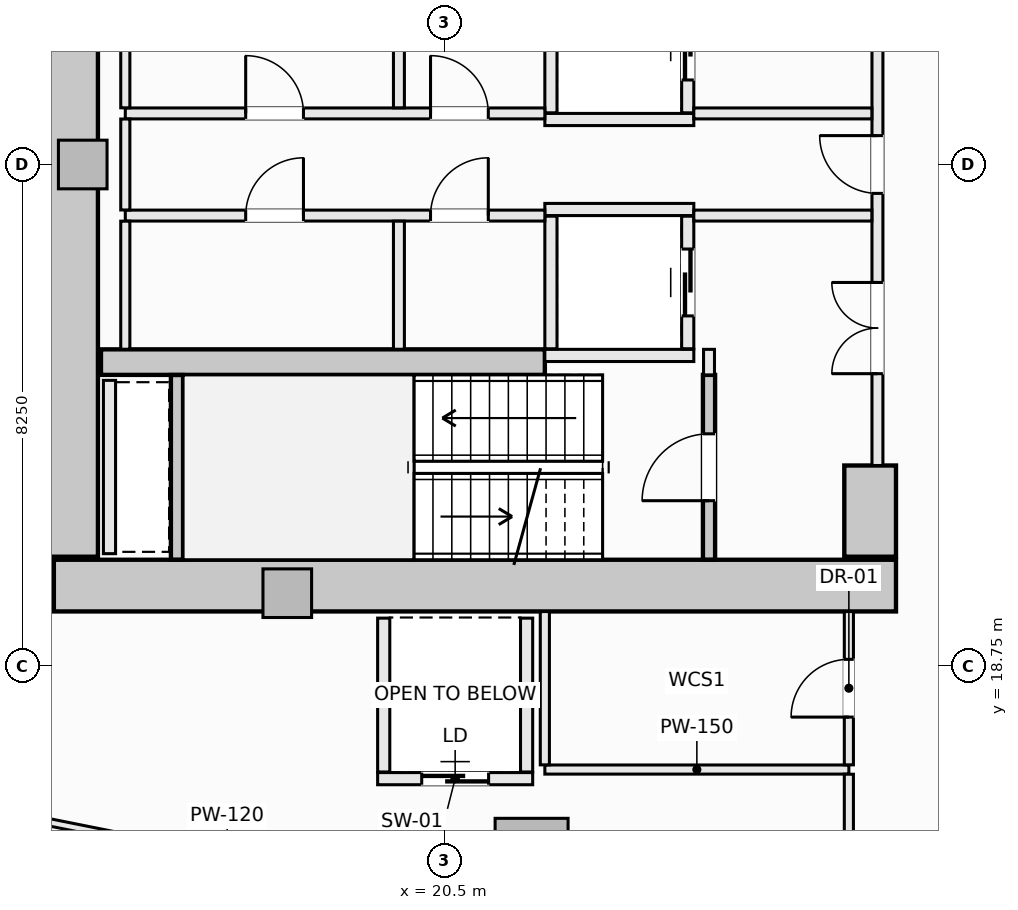
"""IFC4 building model, lengths in metres.
Left out: names, types, materials, properties, quantities, classifications, styles, units other than length and angle.
Written with IfcOpenShell. Run it as: python <this file> out.ifc"""

import sys

from ifc_helpers import new_model, si_unit, direction, frame, frame_2d, origin, origin_2d, place, context, subcontext, project, spatial, rectangle, extrude, element, fill, save


model = new_model("IFC4")
c1 = context("Model", 3, precision=1e-05, world=origin(), true_north=direction((0.0, 1.0)))
c2 = subcontext(c1, "Body", "Model", "MODEL_VIEW")
j1 = project(units=[si_unit("LENGTHUNIT", "METRE"), si_unit("PLANEANGLEUNIT", "RADIAN")], contexts=[c1])
p1 = place(None, origin())
s1 = spatial("IfcSite", under=j1, at=p1, CompositionType="ELEMENT")
p2 = place(p1, origin())
s2 = spatial("IfcBuilding", under=s1, at=p2, CompositionType="ELEMENT")
p3 = place(p2, frame((0.0, 0.0, 57.3)))
s3 = spatial("IfcBuildingStorey", under=s2, at=p3, CompositionType="ELEMENT", Elevation=57.3)
p4 = place(p3, frame((14.075, 20.075, -0.28), z_axis=(0.0, 0.0, 1.0), x_axis=(1.0, 0.0, 0.0)))
e1 = element("IfcWall", 1, at=p4, inside=s3, PredefinedType="SHEAR", context=c2, shape_type="SweptSolid", body=[
    extrude(rectangle(XDim=13.85, YDim=0.85, at=frame_2d((6.925, 0.0))), origin(), (0.0, 0.0, 1.0), 3.85),
])
p5 = place(p3, frame((14.375, 20.55, -0.28), z_axis=(0.0, 0.0, 1.0), x_axis=(0.0, 1.0, 0.0)))
e2 = element("IfcWall", 2, at=p5, inside=s3, PredefinedType="SHEAR", context=c2, shape_type="SweptSolid", body=[
    extrude(rectangle(XDim=12.9, YDim=0.85, at=frame_2d((6.45, 0.0))), origin(), (0.0, 0.0, 1.0), 3.85),
])
p6 = place(p3, frame((27.5, 20.55, -0.28), z_axis=(0.0, 0.0, 1.0), x_axis=(0.0, 1.0, 0.0)))
e3 = element("IfcWall", 3, at=p6, inside=s3, PredefinedType="SHEAR", context=c2, shape_type="SweptSolid", body=[
    extrude(rectangle(XDim=1.5, YDim=0.85, at=frame_2d((0.75, 0.0))), origin(), (0.0, 0.0, 1.0), 3.85),
])
p7 = place(p3, frame((14.85, 23.75, -0.28), z_axis=(0.0, 0.0, 1.0), x_axis=(1.0, 0.0, 0.0)))
e4 = element("IfcWall", 4, at=p7, inside=s3, PredefinedType="SHEAR", context=c2, shape_type="SweptSolid", body=[
    extrude(rectangle(XDim=7.3, YDim=0.42, at=frame_2d((3.65, 0.0))), origin(), (0.0, 0.0, 1.0), 3.85),
])
p8 = place(p3, frame((21.932, 15.648, -0.28), z_axis=(0.0, 0.0, 1.0), x_axis=(1.0, 0.0, 0.0)))
e5 = element("IfcColumn", 5, at=p8, inside=s3, PredefinedType="COLUMN", context=c2, shape_type="SweptSolid", body=[
    extrude(rectangle(XDim=1.2, YDim=1.2, at=origin_2d()), origin(), (0.0, 0.0, 1.0), 3.85),
])
for number, where, z_axis, x_axis in (
    (6, (14.55, 27.0, -0.28), (0.0, 0.0, 1.0), (1.0, 0.0, 0.0)),
    (7, (17.914, 19.95, -0.28), (0.0, 0.0, 1.0), (1.0, 0.0, 0.0)),
):
    element("IfcColumn", number, at=place(p3, frame(where, z_axis=z_axis, x_axis=x_axis)), inside=s3, PredefinedType="PILASTER", context=c2, shape_type="SweptSolid", body=[
        extrude(rectangle(XDim=0.8, YDim=0.8, at=origin_2d()), origin(), (0.0, 0.0, 1.0), 3.85),
    ])
p9 = place(p3, frame((24.85, 20.502, -0.28), z_axis=(0.0, 0.0, 1.0), x_axis=(0.0, 1.0, 0.0)))
e8 = element("IfcWall", 8, at=p9, inside=s3, PredefinedType="SHEAR", context=c2, shape_type="SweptSolid", body=[
    extrude(rectangle(XDim=3.038, YDim=0.2, at=frame_2d((1.519, 0.0))), origin(), (0.0, 0.0, 1.0), 3.85),
])
p10 = place(p9, frame((0.969, 0.0, 0.28)))
e9 = element("IfcOpeningElement", 9, at=p10, cuts=e8, PredefinedType="OPENING", context=c2, shape_type="SweptSolid", body=[
    extrude(rectangle(XDim=1.1, YDim=2.15, at=frame_2d((0.55, 1.075))), frame((0.0, 0.11, 0.0), z_axis=(0.0, -1.0, 0.0), x_axis=(1.0, 0.0, 0.0)), (0.0, 0.0, 1.0), 0.22),
])
p11 = place(p3, frame((16.1, 20.502, -0.28), z_axis=(0.0, 0.0, 1.0), x_axis=(0.0, 1.0, 0.0)))
e10 = element("IfcWall", 10, at=p11, inside=s3, PredefinedType="SHEAR", context=c2, shape_type="SweptSolid", body=[
    extrude(rectangle(XDim=3.036, YDim=0.2, at=frame_2d((1.518, 0.0))), origin(), (0.0, 0.0, 1.0), 3.85),
])
p12 = place(p3, frame((22.15, 27.74, 0.0), z_axis=(0.0, 0.0, 1.0), x_axis=(1.0, 0.0, 0.0)))
e11 = element("IfcWall", 11, at=p12, inside=s3, PredefinedType="SOLIDWALL", context=c2, shape_type="SweptSolid", body=[
    extrude(rectangle(XDim=2.45, YDim=0.2, at=frame_2d((1.225, 0.0))), origin(), (0.0, 0.0, 1.0), 3.57),
])
p13 = place(p3, frame((22.25, 27.85, 0.0), z_axis=(0.0, 0.0, 1.0), x_axis=(0.0, 1.0, 0.0)))
e12 = element("IfcWall", 12, at=p13, inside=s3, PredefinedType="SOLIDWALL", context=c2, shape_type="SweptSolid", body=[
    extrude(rectangle(XDim=2.18, YDim=0.2, at=frame_2d((1.09, 0.0))), origin(), (0.0, 0.0, 1.0), 3.57),
])
p14 = place(p3, frame((24.5, 27.85, 0.0), z_axis=(0.0, 0.0, 1.0), x_axis=(0.0, 1.0, 0.0)))
e13 = element("IfcWall", 13, at=p14, inside=s3, PredefinedType="SOLIDWALL", context=c2, shape_type="SweptSolid", body=[
    extrude(rectangle(XDim=2.18, YDim=0.2, at=frame_2d((1.09, 0.0))), origin(), (0.0, 0.0, 1.0), 3.57),
])
p15 = place(p14, frame((0.54, 0.0, 0.0)))
e14 = element("IfcOpeningElement", 14, at=p15, cuts=e13, PredefinedType="OPENING", context=c2, shape_type="SweptSolid", body=[
    extrude(rectangle(XDim=1.1, YDim=2.2, at=frame_2d((0.55, 1.1))), frame((0.0, 0.11, 0.0), z_axis=(0.0, -1.0, 0.0), x_axis=(1.0, 0.0, 0.0)), (0.0, 0.0, 1.0), 0.22),
])
for number, where, z_axis, x_axis in (
    (15, (22.15, 26.26, 0.0), (0.0, 0.0, 1.0), (1.0, 0.0, 0.0)),
    (16, (22.15, 23.86, 0.0), (0.0, 0.0, 1.0), (1.0, 0.0, 0.0)),
):
    element("IfcWall", number, at=place(p3, frame(where, z_axis=z_axis, x_axis=x_axis)), inside=s3, PredefinedType="SOLIDWALL", context=c2, shape_type="SweptSolid", body=[
        extrude(rectangle(XDim=2.45, YDim=0.2, at=frame_2d((1.225, 0.0))), origin(), (0.0, 0.0, 1.0), 3.57),
    ])
p16 = place(p3, frame((22.25, 23.97, 0.0), z_axis=(0.0, 0.0, 1.0), x_axis=(0.0, 1.0, 0.0)))
e17 = element("IfcWall", 17, at=p16, inside=s3, PredefinedType="SOLIDWALL", context=c2, shape_type="SweptSolid", body=[
    extrude(rectangle(XDim=2.18, YDim=0.2, at=frame_2d((1.09, 0.0))), origin(), (0.0, 0.0, 1.0), 3.57),
])
p17 = place(p3, frame((24.5, 23.97, 0.0), z_axis=(0.0, 0.0, 1.0), x_axis=(0.0, 1.0, 0.0)))
e18 = element("IfcWall", 18, at=p17, inside=s3, PredefinedType="SOLIDWALL", context=c2, shape_type="SweptSolid", body=[
    extrude(rectangle(XDim=2.18, YDim=0.2, at=frame_2d((1.09, 0.0))), origin(), (0.0, 0.0, 1.0), 3.57),
])
p18 = place(p17, frame((0.54, 0.0, 0.0)))
e19 = element("IfcOpeningElement", 19, at=p18, cuts=e18, PredefinedType="OPENING", context=c2, shape_type="SweptSolid", body=[
    extrude(rectangle(XDim=1.1, YDim=2.2, at=frame_2d((0.55, 1.1))), frame((0.0, 0.11, 0.0), z_axis=(0.0, -1.0, 0.0), x_axis=(1.0, 0.0, 0.0)), (0.0, 0.0, 1.0), 0.22),
])
p19 = place(p3, frame((19.4, 16.9, 0.0), z_axis=(0.0, 0.0, 1.0), x_axis=(1.0, 0.0, 0.0)))
e20 = element("IfcWall", 20, at=p19, inside=s3, PredefinedType="SOLIDWALL", context=c2, shape_type="SweptSolid", body=[
    extrude(rectangle(XDim=2.55, YDim=0.2, at=frame_2d((1.275, 0.0))), origin(), (0.0, 0.0, 1.0), 3.57),
])
p20 = place(p19, frame((0.725, 0.0, 0.0)))
e21 = element("IfcOpeningElement", 21, at=p20, cuts=e20, PredefinedType="OPENING", context=c2, shape_type="SweptSolid", body=[
    extrude(rectangle(XDim=1.1, YDim=2.2, at=frame_2d((0.55, 1.1))), frame((0.0, 0.11, 0.0), z_axis=(0.0, -1.0, 0.0), x_axis=(1.0, 0.0, 0.0)), (0.0, 0.0, 1.0), 0.22),
])
for number, where, z_axis, x_axis in (
    (22, (19.5, 17.01, 0.0), (0.0, 0.0, 1.0), (0.0, 1.0, 0.0)),
    (23, (21.85, 17.01, 0.0), (0.0, 0.0, 1.0), (0.0, 1.0, 0.0)),
):
    element("IfcWall", number, at=place(p3, frame(where, z_axis=z_axis, x_axis=x_axis)), inside=s3, PredefinedType="SOLIDWALL", context=c2, shape_type="SweptSolid", body=[
        extrude(rectangle(XDim=2.53, YDim=0.2, at=frame_2d((1.265, 0.0))), origin(), (0.0, 0.0, 1.0), 3.57),
    ])
p21 = place(p3, frame((14.99, 20.6, 0.0), z_axis=(0.0, 0.0, 1.0), x_axis=(0.0, 1.0, 0.0)))
e24 = element("IfcWall", 24, at=p21, inside=s3, PredefinedType="SOLIDWALL", context=c2, shape_type="SweptSolid", body=[
    extrude(rectangle(XDim=2.85, YDim=0.2, at=frame_2d((1.425, 0.0))), origin(), (0.0, 0.0, 1.0), 3.57),
])
p22 = place(p3, frame((24.85, 23.54, 0.0), z_axis=(0.0, 0.0, 1.0), x_axis=(0.0, 1.0, 0.0)))
e25 = element("IfcWall", 25, at=p22, inside=s3, PredefinedType="SOLIDWALL", context=c2, shape_type="SweptSolid", body=[
    extrude(rectangle(XDim=0.42, YDim=0.18, at=frame_2d((0.21, 0.0))), origin(), (0.0, 0.0, 1.0), 3.57),
])
p23 = place(p3, frame((27.62, 22.05, 0.0), z_axis=(0.0, 0.0, 1.0), x_axis=(0.0, 1.0, 0.0)))
e26 = element("IfcWall", 26, at=p23, inside=s3, PredefinedType="SOLIDWALL", context=c2, shape_type="SweptSolid", body=[
    extrude(rectangle(XDim=9.9, YDim=0.18, at=frame_2d((4.95, 0.0))), origin(), (0.0, 0.0, 1.0), 2.662),
])
p24 = place(p23, frame((4.475, 0.0, 0.0)))
e27 = element("IfcOpeningElement", 27, at=p24, cuts=e26, PredefinedType="OPENING", context=c2, shape_type="SweptSolid", body=[
    extrude(rectangle(XDim=0.95, YDim=2.1, at=frame_2d((0.475, 1.05))), frame((0.0, 0.1, 0.0), z_axis=(0.0, -1.0, 0.0), x_axis=(1.0, 0.0, 0.0)), (0.0, 0.0, 1.0), 0.2),
])
p25 = place(p23, frame((6.89, 0.0, 0.0)))
e28 = element("IfcOpeningElement", 28, at=p25, cuts=e26, PredefinedType="OPENING", context=c2, shape_type="SweptSolid", body=[
    extrude(rectangle(XDim=1.5, YDim=2.2, at=frame_2d((0.75, 1.1))), frame((0.0, 0.1, 0.0), z_axis=(0.0, -1.0, 0.0), x_axis=(1.0, 0.0, 0.0)), (0.0, 0.0, 1.0), 0.2),
])
p26 = place(p23, frame((1.51, 0.0, 0.0)))
e29 = element("IfcOpeningElement", 29, at=p26, cuts=e26, PredefinedType="OPENING", context=c2, shape_type="SweptSolid", body=[
    extrude(rectangle(XDim=1.5, YDim=2.2, at=frame_2d((0.75, 1.1))), frame((0.0, 0.1, 0.0), z_axis=(0.0, -1.0, 0.0), x_axis=(1.0, 0.0, 0.0)), (0.0, 0.0, 1.0), 0.2),
])
p27 = place(p3, frame((15.25, 27.84, 0.0), z_axis=(0.0, 0.0, 1.0), x_axis=(1.0, 0.0, 0.0)))
e30 = element("IfcWall", 30, at=p27, inside=s3, PredefinedType="SOLIDWALL", context=c2, shape_type="SweptSolid", body=[
    extrude(rectangle(XDim=6.9, YDim=0.18, at=frame_2d((3.45, 0.0))), origin(), (0.0, 0.0, 1.0), 3.57),
])
p28 = place(p27, frame((5.02, 0.0, 0.0)))
e31 = element("IfcOpeningElement", 31, at=p28, cuts=e30, PredefinedType="OPENING", context=c2, shape_type="SweptSolid", body=[
    extrude(rectangle(XDim=0.95, YDim=2.1, at=frame_2d((0.475, 1.05))), frame((0.0, 0.1, 0.0), z_axis=(0.0, -1.0, 0.0), x_axis=(1.0, 0.0, 0.0)), (0.0, 0.0, 1.0), 0.2),
])
p29 = place(p27, frame((1.98, 0.0, 0.0)))
e32 = element("IfcOpeningElement", 32, at=p29, cuts=e30, PredefinedType="OPENING", context=c2, shape_type="SweptSolid", body=[
    extrude(rectangle(XDim=0.95, YDim=2.1, at=frame_2d((0.475, 1.05))), frame((0.0, 0.1, 0.0), z_axis=(0.0, -1.0, 0.0), x_axis=(1.0, 0.0, 0.0)), (0.0, 0.0, 1.0), 0.2),
])
p30 = place(p3, frame((24.6, 27.84, 0.0), z_axis=(0.0, 0.0, 1.0), x_axis=(1.0, 0.0, 0.0)))
e33 = element("IfcWall", 33, at=p30, inside=s3, PredefinedType="SOLIDWALL", context=c2, shape_type="SweptSolid", body=[
    extrude(rectangle(XDim=2.928, YDim=0.18, at=frame_2d((1.464, 0.0))), origin(), (0.0, 0.0, 1.0), 3.57),
])
p31 = place(p3, frame((15.25, 26.16, 0.0), z_axis=(0.0, 0.0, 1.0), x_axis=(1.0, 0.0, 0.0)))
e34 = element("IfcWall", 34, at=p31, inside=s3, PredefinedType="SOLIDWALL", context=c2, shape_type="SweptSolid", body=[
    extrude(rectangle(XDim=6.9, YDim=0.18, at=frame_2d((3.45, 0.0))), origin(), (0.0, 0.0, 1.0), 3.57),
])
p32 = place(p31, frame((5.02, 0.0, 0.0)))
e35 = element("IfcOpeningElement", 35, at=p32, cuts=e34, PredefinedType="OPENING", context=c2, shape_type="SweptSolid", body=[
    extrude(rectangle(XDim=0.95, YDim=2.1, at=frame_2d((0.475, 1.05))), frame((0.0, 0.1, 0.0), z_axis=(0.0, -1.0, 0.0), x_axis=(1.0, 0.0, 0.0)), (0.0, 0.0, 1.0), 0.2),
])
p33 = place(p31, frame((1.98, 0.0, 0.0)))
e36 = element("IfcOpeningElement", 36, at=p33, cuts=e34, PredefinedType="OPENING", context=c2, shape_type="SweptSolid", body=[
    extrude(rectangle(XDim=0.95, YDim=2.1, at=frame_2d((0.475, 1.05))), frame((0.0, 0.1, 0.0), z_axis=(0.0, -1.0, 0.0), x_axis=(1.0, 0.0, 0.0)), (0.0, 0.0, 1.0), 0.2),
])
p34 = place(p3, frame((24.6, 26.16, 0.0), z_axis=(0.0, 0.0, 1.0), x_axis=(1.0, 0.0, 0.0)))
e37 = element("IfcWall", 37, at=p34, inside=s3, PredefinedType="SOLIDWALL", context=c2, shape_type="SweptSolid", body=[
    extrude(rectangle(XDim=2.928, YDim=0.18, at=frame_2d((1.464, 0.0))), origin(), (0.0, 0.0, 1.0), 3.57),
])
p35 = place(p3, frame((15.25, 23.962, 0.0), z_axis=(0.0, 0.0, 1.0), x_axis=(0.0, 1.0, 0.0)))
e38 = element("IfcWall", 38, at=p35, inside=s3, PredefinedType="PARTITIONING", context=c2, shape_type="SweptSolid", body=[
    extrude(rectangle(XDim=2.106, YDim=0.15, at=frame_2d((1.053, 0.0))), origin(), (0.0, 0.0, 1.0), 3.57),
])
p36 = place(p3, frame((15.25, 26.252, 0.0), z_axis=(0.0, 0.0, 1.0), x_axis=(0.0, 1.0, 0.0)))
e39 = element("IfcWall", 39, at=p36, inside=s3, PredefinedType="PARTITIONING", context=c2, shape_type="SweptSolid", body=[
    extrude(rectangle(XDim=1.496, YDim=0.15, at=frame_2d((0.748, 0.0))), origin(), (0.0, 0.0, 1.0), 3.57),
])
p37 = place(p3, frame((15.25, 27.932, 0.0), z_axis=(0.0, 0.0, 1.0), x_axis=(0.0, 1.0, 0.0)))
e40 = element("IfcWall", 40, at=p37, inside=s3, PredefinedType="PARTITIONING", context=c2, shape_type="SweptSolid", body=[
    extrude(rectangle(XDim=2.106, YDim=0.15, at=frame_2d((1.053, 0.0))), origin(), (0.0, 0.0, 1.0), 3.57),
])
for number, where, z_axis, x_axis in (
    (41, (19.75, 23.962, 0.0), (0.0, 0.0, 1.0), (0.0, 1.0, 0.0)),
    (42, (19.75, 27.932, 0.0), (0.0, 0.0, 1.0), (0.0, 1.0, 0.0)),
):
    element("IfcWall", number, at=place(p3, frame(where, z_axis=z_axis, x_axis=x_axis)), inside=s3, PredefinedType="SOLIDWALL", context=c2, shape_type="SweptSolid", body=[
        extrude(rectangle(XDim=2.106, YDim=0.18, at=frame_2d((1.053, 0.0))), origin(), (0.0, 0.0, 1.0), 3.57),
    ])
p38 = place(p3, frame((22.15, 17.05, 0.0), z_axis=(0.0, 0.0, 1.0), x_axis=(1.0, 0.0, 0.0)))
e43 = element("IfcWall", 43, at=p38, inside=s3, PredefinedType="PARTITIONING", context=c2, shape_type="SweptSolid", body=[
    extrude(rectangle(XDim=5.0, YDim=0.15, at=frame_2d((2.5, 0.0))), origin(), (0.0, 0.0, 1.0), 3.57),
])
p39 = place(p3, frame((22.15, 17.127, 0.0), z_axis=(0.0, 0.0, 1.0), x_axis=(0.0, 1.0, 0.0)))
e44 = element("IfcWall", 44, at=p39, inside=s3, PredefinedType="PARTITIONING", context=c2, shape_type="SweptSolid", body=[
    extrude(rectangle(XDim=2.521, YDim=0.15, at=frame_2d((1.26, 0.0))), origin(), (0.0, 0.0, 1.0), 3.57),
])
p40 = place(p3, frame((27.15, 11.75, 0.0), z_axis=(0.0, 0.0, 1.0), x_axis=(0.0, 1.0, 0.0)))
e45 = element("IfcWall", 45, at=p40, inside=s3, PredefinedType="PARTITIONING", context=c2, shape_type="SweptSolid", body=[
    extrude(rectangle(XDim=5.223, YDim=0.15, at=frame_2d((2.611, 0.0))), origin(), (0.0, 0.0, 1.0), 3.57),
])
p41 = place(p40, frame((0.631, 0.0, 0.0)))
e46 = element("IfcOpeningElement", 46, at=p41, cuts=e45, PredefinedType="OPENING", context=c2, shape_type="SweptSolid", body=[
    extrude(rectangle(XDim=0.95, YDim=2.1, at=frame_2d((0.475, 1.05))), frame((0.0, 0.085, 0.0), z_axis=(0.0, -1.0, 0.0), x_axis=(1.0, 0.0, 0.0)), (0.0, 0.0, 1.0), 0.17),
])
p42 = place(p40, frame((2.828, 0.0, 0.0)))
e47 = element("IfcOpeningElement", 47, at=p42, cuts=e45, PredefinedType="OPENING", context=c2, shape_type="SweptSolid", body=[
    extrude(rectangle(XDim=0.95, YDim=2.1, at=frame_2d((0.475, 1.05))), frame((0.0, 0.085, 0.0), z_axis=(0.0, -1.0, 0.0), x_axis=(1.0, 0.0, 0.0)), (0.0, 0.0, 1.0), 0.17),
])
p43 = place(p3, frame((27.15, 17.127, 0.0), z_axis=(0.0, 0.0, 1.0), x_axis=(0.0, 1.0, 0.0)))
e48 = element("IfcWall", 48, at=p43, inside=s3, PredefinedType="PARTITIONING", context=c2, shape_type="SweptSolid", body=[
    extrude(rectangle(XDim=2.521, YDim=0.15, at=frame_2d((1.26, 0.0))), origin(), (0.0, 0.0, 1.0), 3.57),
])
p44 = place(p43, frame((0.785, 0.0, 0.0)))
e49 = element("IfcOpeningElement", 49, at=p44, cuts=e48, PredefinedType="OPENING", context=c2, shape_type="SweptSolid", body=[
    extrude(rectangle(XDim=0.95, YDim=2.1, at=frame_2d((0.475, 1.05))), frame((0.0, 0.085, 0.0), z_axis=(0.0, -1.0, 0.0), x_axis=(1.0, 0.0, 0.0)), (0.0, 0.0, 1.0), 0.17),
])
p45 = place(p3, frame((6.777, 17.629, 0.0), z_axis=(0.0, 0.0, 1.0), x_axis=(0.980522111168, -0.19640873074, 0.0)))
e50 = element("IfcWall", 50, at=p45, inside=s3, PredefinedType="PARTITIONING", context=c2, shape_type="SweptSolid", body=[
    extrude(rectangle(XDim=20.699, YDim=0.12, at=frame_2d((10.349, 0.0))), origin(), (0.0, 0.0, 1.0), 3.205),
])
p46 = place(p10, origin())
e51 = element("IfcDoor", 51, at=p46, inside=s3, OperationType="SINGLE_SWING_LEFT", PredefinedType="DOOR", context=c2, shape_type="SweptSolid", body=[
    extrude(rectangle(XDim=1.1, YDim=2.15, at=frame_2d((0.55, 1.075))), frame((0.0, 0.025, 0.0), z_axis=(0.0, -1.0, 0.0), x_axis=(1.0, 0.0, 0.0)), (0.0, 0.0, 1.0), 0.05),
])
fill(e9, e51)
p47 = place(p15, origin())
e52 = element("IfcDoor", 52, at=p47, inside=s3, OperationType="SLIDING_TO_LEFT", PredefinedType="DOOR", context=c2, shape_type="SweptSolid", body=[
    extrude(rectangle(XDim=1.1, YDim=2.2, at=frame_2d((0.55, 1.1))), frame((0.0, 0.025, 0.0), z_axis=(0.0, -1.0, 0.0), x_axis=(1.0, 0.0, 0.0)), (0.0, 0.0, 1.0), 0.05),
])
fill(e14, e52)
p48 = place(p18, origin())
e53 = element("IfcDoor", 53, at=p48, inside=s3, OperationType="SLIDING_TO_LEFT", PredefinedType="DOOR", context=c2, shape_type="SweptSolid", body=[
    extrude(rectangle(XDim=1.1, YDim=2.2, at=frame_2d((0.55, 1.1))), frame((0.0, 0.025, 0.0), z_axis=(0.0, -1.0, 0.0), x_axis=(1.0, 0.0, 0.0)), (0.0, 0.0, 1.0), 0.05),
])
fill(e19, e53)
p49 = place(p20, origin())
e54 = element("IfcDoor", 54, at=p49, inside=s3, OperationType="SLIDING_TO_LEFT", PredefinedType="DOOR", context=c2, shape_type="SweptSolid", body=[
    extrude(rectangle(XDim=1.1, YDim=2.2, at=frame_2d((0.55, 1.1))), frame((0.0, 0.025, 0.0), z_axis=(0.0, -1.0, 0.0), x_axis=(1.0, 0.0, 0.0)), (0.0, 0.0, 1.0), 0.05),
])
fill(e21, e54)
p50 = place(p24, origin())
e55 = element("IfcDoor", 55, at=p50, inside=s3, OperationType="SINGLE_SWING_RIGHT", PredefinedType="DOOR", context=c2, shape_type="SweptSolid", body=[
    extrude(rectangle(XDim=0.95, YDim=2.1, at=frame_2d((0.475, 1.05))), frame((0.0, 0.025, 0.0), z_axis=(0.0, -1.0, 0.0), x_axis=(1.0, 0.0, 0.0)), (0.0, 0.0, 1.0), 0.05),
])
fill(e27, e55)
p51 = place(p26, origin())
e56 = element("IfcDoor", 56, at=p51, inside=s3, OperationType="DOUBLE_DOOR_SINGLE_SWING", PredefinedType="DOOR", context=c2, shape_type="SweptSolid", body=[
    extrude(rectangle(XDim=1.5, YDim=2.2, at=frame_2d((0.75, 1.1))), frame((0.0, 0.025, 0.0), z_axis=(0.0, -1.0, 0.0), x_axis=(1.0, 0.0, 0.0)), (0.0, 0.0, 1.0), 0.05),
])
fill(e29, e56)
p52 = place(p28, origin())
e57 = element("IfcDoor", 57, at=p52, inside=s3, OperationType="SINGLE_SWING_LEFT", PredefinedType="DOOR", context=c2, shape_type="SweptSolid", body=[
    extrude(rectangle(XDim=0.95, YDim=2.1, at=frame_2d((0.475, 1.05))), frame((0.0, 0.025, 0.0), z_axis=(0.0, -1.0, 0.0), x_axis=(1.0, 0.0, 0.0)), (0.0, 0.0, 1.0), 0.05),
])
fill(e31, e57)
p53 = place(p32, origin())
e58 = element("IfcDoor", 58, at=p53, inside=s3, OperationType="SINGLE_SWING_RIGHT", PredefinedType="DOOR", context=c2, shape_type="SweptSolid", body=[
    extrude(rectangle(XDim=0.95, YDim=2.1, at=frame_2d((0.475, 1.05))), frame((0.0, 0.025, 0.0), z_axis=(0.0, -1.0, 0.0), x_axis=(1.0, 0.0, 0.0)), (0.0, 0.0, 1.0), 0.05),
])
fill(e35, e58)
p54 = place(p29, origin())
e59 = element("IfcDoor", 59, at=p54, inside=s3, OperationType="SINGLE_SWING_LEFT", PredefinedType="DOOR", context=c2, shape_type="SweptSolid", body=[
    extrude(rectangle(XDim=0.95, YDim=2.1, at=frame_2d((0.475, 1.05))), frame((0.0, 0.025, 0.0), z_axis=(0.0, -1.0, 0.0), x_axis=(1.0, 0.0, 0.0)), (0.0, 0.0, 1.0), 0.05),
])
fill(e32, e59)
p55 = place(p33, origin())
e60 = element("IfcDoor", 60, at=p55, inside=s3, OperationType="SINGLE_SWING_RIGHT", PredefinedType="DOOR", context=c2, shape_type="SweptSolid", body=[
    extrude(rectangle(XDim=0.95, YDim=2.1, at=frame_2d((0.475, 1.05))), frame((0.0, 0.025, 0.0), z_axis=(0.0, -1.0, 0.0), x_axis=(1.0, 0.0, 0.0)), (0.0, 0.0, 1.0), 0.05),
])
fill(e36, e60)
p56 = place(p44, origin())
e61 = element("IfcDoor", 61, at=p56, inside=s3, OperationType="SINGLE_SWING_LEFT", PredefinedType="DOOR", context=c2, shape_type="SweptSolid", body=[
    extrude(rectangle(XDim=0.95, YDim=2.1, at=frame_2d((0.475, 1.05))), frame((0.0, 0.025, 0.0), z_axis=(0.0, -1.0, 0.0), x_axis=(1.0, 0.0, 0.0)), (0.0, 0.0, 1.0), 0.05),
])
fill(e49, e61)
save(model, sys.argv[1])
